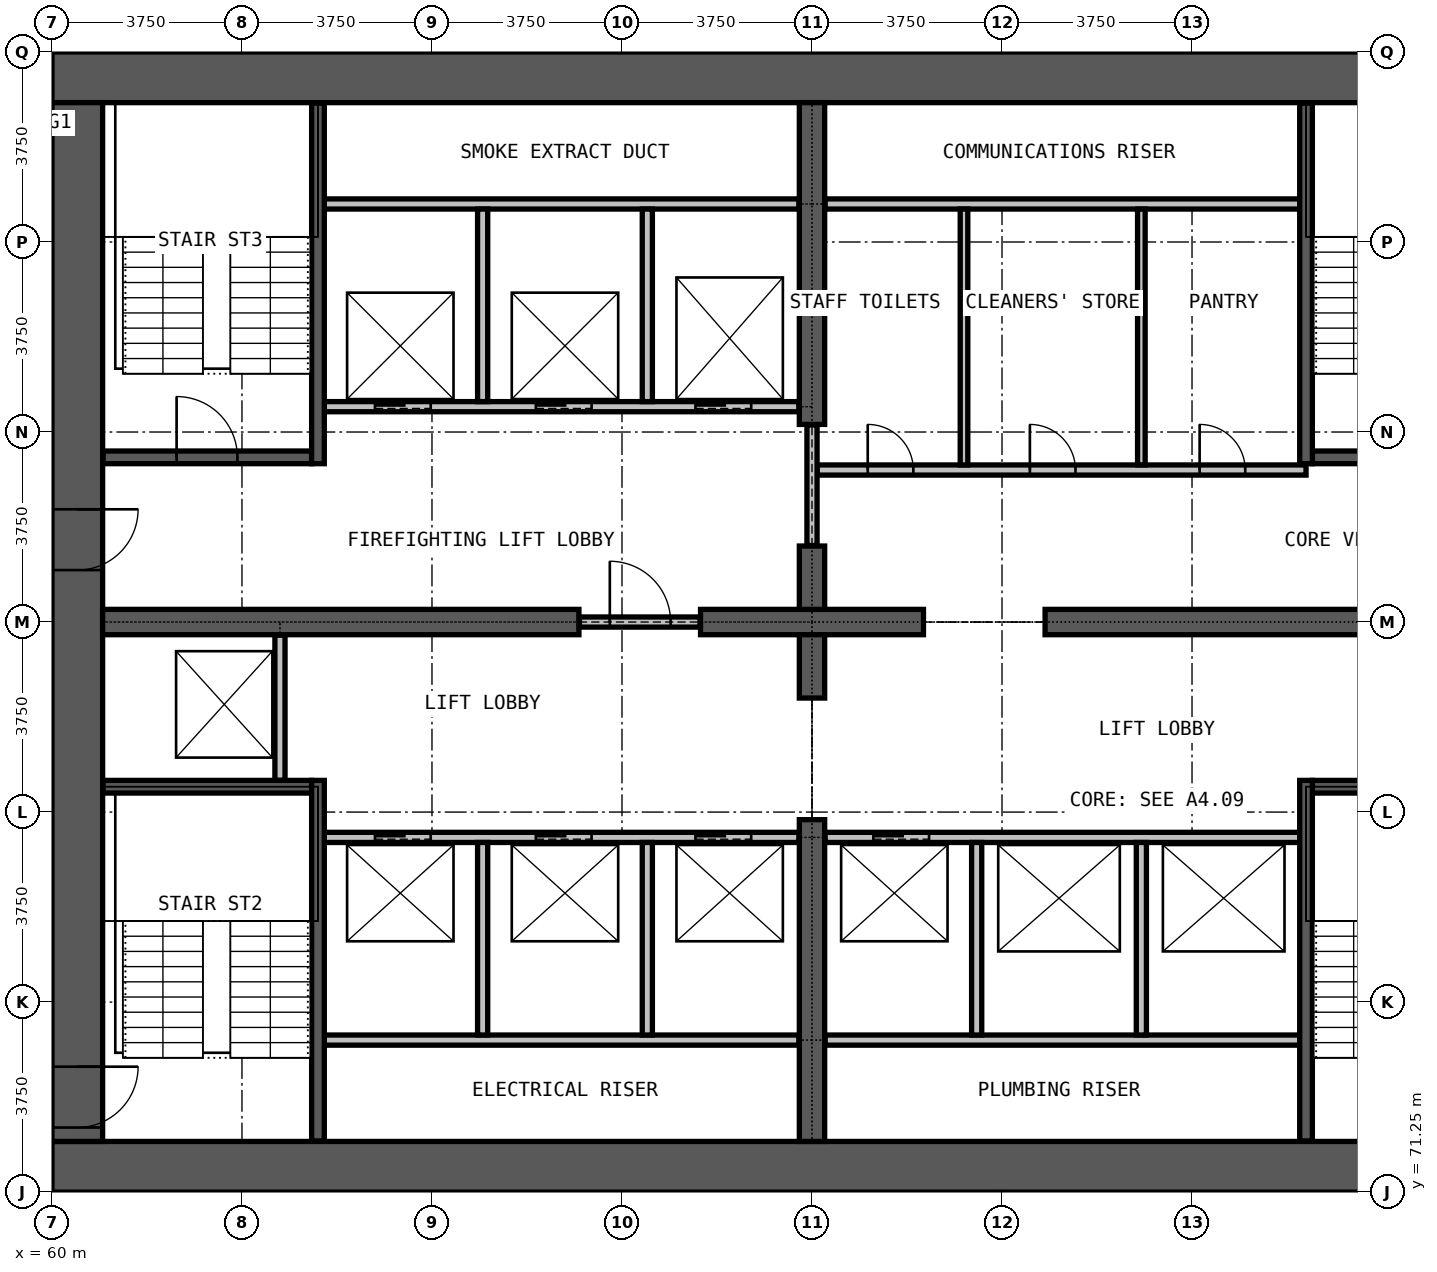
"""IFC4 building model, lengths in metres.
Left out: names, types, materials, properties, quantities, classifications, styles, units other than length and angle.
Written with IfcOpenShell. Run it as: python <this file> out.ifc"""

import sys

from ifc_helpers import new_model, si_unit, direction, frame, frame_2d, origin, place, context, subcontext, project, spatial, rectangle, extrude, element, fill, save


model = new_model("IFC4")
c1 = context("Model", 3, precision=1e-05, world=origin(), true_north=direction((0.0, 1.0)))
c2 = subcontext(c1, "Body", "Model", "MODEL_VIEW")
j1 = project(units=[si_unit("LENGTHUNIT", "METRE"), si_unit("PLANEANGLEUNIT", "RADIAN")], contexts=[c1])
p1 = place(None, origin())
s1 = spatial("IfcSite", under=j1, at=p1, CompositionType="ELEMENT")
p2 = place(p1, origin())
s2 = spatial("IfcBuilding", under=s1, at=p2, CompositionType="ELEMENT")
p3 = place(p2, frame((0.0, 0.0, 62.6)))
s3 = spatial("IfcBuildingStorey", under=s2, at=p3, CompositionType="ELEMENT", Elevation=62.6)
for number, where, z_axis, x_axis in (
    (1, (60.0, 71.75, 0.0), (0.0, 0.0, 1.0), (1.0, 0.0, 0.0)),
    (2, (90.0, 93.25, 0.0), (0.0, 0.0, 1.0), (-1.0, 0.0, 0.0)),
):
    element("IfcWall", number, at=place(p3, frame(where, z_axis=z_axis, x_axis=x_axis)), inside=s3, PredefinedType="SHEAR", context=c2, shape_type="SweptSolid", body=[
        extrude(rectangle(XDim=30.0, YDim=1.0, at=frame_2d((15.0, 0.0))), origin(), (0.0, 0.0, 1.0), 3.3),
    ])
p4 = place(p3, frame((60.5, 92.75, 0.0), z_axis=(0.0, 0.0, 1.0), x_axis=(0.0, -1.0, 0.0)))
e3 = element("IfcWall", 3, at=p4, inside=s3, PredefinedType="SHEAR", context=c2, shape_type="SweptSolid", body=[
    extrude(rectangle(XDim=20.5, YDim=1.0, at=frame_2d((10.25, 0.0))), origin(), (0.0, 0.0, 1.0), 3.3),
])
p5 = place(p4, frame((19.025, 0.0, 0.0)))
e4 = element("IfcOpeningElement", 4, at=p5, cuts=e3, PredefinedType="OPENING", context=c2, shape_type="SweptSolid", body=[
    extrude(rectangle(XDim=1.2, YDim=2.2, at=frame_2d((0.6, 1.1))), frame((0.0, 0.51, 0.0), z_axis=(0.0, -1.0, 0.0), x_axis=(1.0, 0.0, 0.0)), (0.0, 0.0, 1.0), 1.02),
])
p6 = place(p4, frame((8.025, 0.0, 0.0)))
e5 = element("IfcOpeningElement", 5, at=p6, cuts=e3, PredefinedType="OPENING", context=c2, shape_type="SweptSolid", body=[
    extrude(rectangle(XDim=1.2, YDim=2.2, at=frame_2d((0.6, 1.1))), frame((0.0, 0.51, 0.0), z_axis=(0.0, -1.0, 0.0), x_axis=(1.0, 0.0, 0.0)), (0.0, 0.0, 1.0), 1.02),
])
p7 = place(p3, frame((61.0, 82.5, 0.0), z_axis=(0.0, 0.0, 1.0), x_axis=(1.0, 0.0, 0.0)))
e6 = element("IfcWall", 6, at=p7, inside=s3, PredefinedType="SHEAR", context=c2, shape_type="SweptSolid", body=[
    extrude(rectangle(XDim=9.4, YDim=0.5, at=frame_2d((4.7, 0.0))), origin(), (0.0, 0.0, 1.0), 3.3),
])
p8 = place(p3, frame((72.8, 82.5, 0.0), z_axis=(0.0, 0.0, 1.0), x_axis=(1.0, 0.0, 0.0)))
e7 = element("IfcWall", 7, at=p8, inside=s3, PredefinedType="SHEAR", context=c2, shape_type="SweptSolid", body=[
    extrude(rectangle(XDim=4.4, YDim=0.5, at=frame_2d((2.2, 0.0))), origin(), (0.0, 0.0, 1.0), 3.3),
])
p9 = place(p3, frame((79.6, 82.5, 0.0), z_axis=(0.0, 0.0, 1.0), x_axis=(1.0, 0.0, 0.0)))
e8 = element("IfcWall", 8, at=p9, inside=s3, PredefinedType="SHEAR", context=c2, shape_type="SweptSolid", body=[
    extrude(rectangle(XDim=9.4, YDim=0.5, at=frame_2d((4.7, 0.0))), origin(), (0.0, 0.0, 1.0), 3.3),
])
p10 = place(p3, frame((75.0, 72.25, 0.0), z_axis=(0.0, 0.0, 1.0), x_axis=(0.0, 1.0, 0.0)))
e9 = element("IfcWall", 9, at=p10, inside=s3, PredefinedType="SHEAR", context=c2, shape_type="SweptSolid", body=[
    extrude(rectangle(XDim=6.35, YDim=0.5, at=frame_2d((3.175, 0.0))), origin(), (0.0, 0.0, 1.0), 3.3),
])
for number, where, z_axis, x_axis in (
    (10, (75.0, 81.0, 0.0), (0.0, 0.0, 1.0), (0.0, 1.0, 0.0)),
    (11, (75.0, 82.75, 0.0), (0.0, 0.0, 1.0), (0.0, 1.0, 0.0)),
):
    element("IfcWall", number, at=place(p3, frame(where, z_axis=z_axis, x_axis=x_axis)), inside=s3, PredefinedType="SHEAR", context=c2, shape_type="SweptSolid", body=[
        extrude(rectangle(XDim=1.25, YDim=0.5, at=frame_2d((0.625, 0.0))), origin(), (0.0, 0.0, 1.0), 3.3),
    ])
p11 = place(p3, frame((75.0, 86.4, 0.0), z_axis=(0.0, 0.0, 1.0), x_axis=(0.0, 1.0, 0.0)))
e12 = element("IfcWall", 12, at=p11, inside=s3, PredefinedType="SHEAR", context=c2, shape_type="SweptSolid", body=[
    extrude(rectangle(XDim=6.35, YDim=0.5, at=frame_2d((3.175, 0.0))), origin(), (0.0, 0.0, 1.0), 3.3),
])
p12 = place(p3, frame((70.41, 82.5, 0.0), z_axis=(0.0, 0.0, 1.0), x_axis=(1.0, 0.0, 0.0)))
e13 = element("IfcWall", 13, at=p12, inside=s3, PredefinedType="PARTITIONING", context=c2, shape_type="SweptSolid", body=[
    extrude(rectangle(XDim=2.38, YDim=0.2, at=frame_2d((1.19, 0.0))), origin(), (0.0, 0.0, 1.0), 2.4),
])
p13 = place(p12, frame((0.6, 0.0, 0.0)))
e14 = element("IfcOpeningElement", 14, at=p13, cuts=e13, PredefinedType="OPENING", context=c2, shape_type="SweptSolid", body=[
    extrude(rectangle(XDim=1.2, YDim=2.2, at=frame_2d((0.6, 1.1))), frame((0.0, 0.11, 0.0), z_axis=(0.0, -1.0, 0.0), x_axis=(1.0, 0.0, 0.0)), (0.0, 0.0, 1.0), 0.22),
])
p14 = place(p3, frame((75.1, 85.5, 0.0), z_axis=(0.0, 0.0, 1.0), x_axis=(1.0, 0.0, 0.0)))
e15 = element("IfcWall", 15, at=p14, inside=s3, PredefinedType="PARTITIONING", context=c2, shape_type="SweptSolid", body=[
    extrude(rectangle(XDim=9.65, YDim=0.2, at=frame_2d((4.825, 0.0))), origin(), (0.0, 0.0, 1.0), 3.0),
])
p15 = place(p14, frame((1.0, 0.0, 0.0)))
e16 = element("IfcOpeningElement", 16, at=p15, cuts=e15, PredefinedType="OPENING", context=c2, shape_type="SweptSolid", body=[
    extrude(rectangle(XDim=0.9, YDim=2.2, at=frame_2d((0.45, 1.1))), frame((0.0, 0.11, 0.0), z_axis=(0.0, -1.0, 0.0), x_axis=(1.0, 0.0, 0.0)), (0.0, 0.0, 1.0), 0.22),
])
p16 = place(p14, frame((4.2, 0.0, 0.0)))
e17 = element("IfcOpeningElement", 17, at=p16, cuts=e15, PredefinedType="OPENING", context=c2, shape_type="SweptSolid", body=[
    extrude(rectangle(XDim=0.9, YDim=2.2, at=frame_2d((0.45, 1.1))), frame((0.0, 0.11, 0.0), z_axis=(0.0, -1.0, 0.0), x_axis=(1.0, 0.0, 0.0)), (0.0, 0.0, 1.0), 0.22),
])
p17 = place(p14, frame((7.55, 0.0, 0.0)))
e18 = element("IfcOpeningElement", 18, at=p17, cuts=e15, PredefinedType="OPENING", context=c2, shape_type="SweptSolid", body=[
    extrude(rectangle(XDim=0.9, YDim=2.2, at=frame_2d((0.45, 1.1))), frame((0.0, 0.11, 0.0), z_axis=(0.0, -1.0, 0.0), x_axis=(1.0, 0.0, 0.0)), (0.0, 0.0, 1.0), 0.22),
])
p18 = place(p3, frame((75.26, 90.75, 0.0), z_axis=(0.0, 0.0, 1.0), x_axis=(1.0, 0.0, 0.0)))
e19 = element("IfcWall", 19, at=p18, inside=s3, PredefinedType="PARTITIONING", context=c2, shape_type="SweptSolid", body=[
    extrude(rectangle(XDim=9.365, YDim=0.2, at=frame_2d((4.683, 0.0))), origin(), (0.0, 0.0, 1.0), 3.0),
])
p19 = place(p3, frame((75.0, 84.01, 0.0), z_axis=(0.0, 0.0, 1.0), x_axis=(0.0, 1.0, 0.0)))
e20 = element("IfcWall", 20, at=p19, inside=s3, PredefinedType="PARTITIONING", context=c2, shape_type="SweptSolid", body=[
    extrude(rectangle(XDim=2.38, YDim=0.2, at=frame_2d((1.19, 0.0))), origin(), (0.0, 0.0, 1.0), 2.4),
])
for number, where, z_axis, x_axis in (
    (21, (78.0, 85.6, 0.0), (0.0, 0.0, 1.0), (0.0, 1.0, 0.0)),
    (22, (81.5, 85.6, 0.0), (0.0, 0.0, 1.0), (0.0, 1.0, 0.0)),
):
    element("IfcWall", number, at=place(p3, frame(where, z_axis=z_axis, x_axis=x_axis)), inside=s3, PredefinedType="PARTITIONING", context=c2, shape_type="SweptSolid", body=[
        extrude(rectangle(XDim=5.05, YDim=0.15, at=frame_2d((2.525, 0.0))), origin(), (0.0, 0.0, 1.0), 3.0),
    ])
for number, where, z_axis, x_axis in (
    (23, (65.375, 74.25, 0.0), (0.0, 0.0, 1.0), (1.0, 0.0, 0.0)),
    (24, (75.26, 74.25, 0.0), (0.0, 0.0, 1.0), (1.0, 0.0, 0.0)),
):
    element("IfcWall", number, at=place(p3, frame(where, z_axis=z_axis, x_axis=x_axis)), inside=s3, PredefinedType="PARTITIONING", context=c2, shape_type="SweptSolid", body=[
        extrude(rectangle(XDim=9.365, YDim=0.2, at=frame_2d((4.683, 0.0))), origin(), (0.0, 0.0, 1.0), 3.0),
    ])
p20 = place(p3, frame((65.375, 78.25, 0.0), z_axis=(0.0, 0.0, 1.0), x_axis=(1.0, 0.0, 0.0)))
e25 = element("IfcWall", 25, at=p20, inside=s3, PredefinedType="PARTITIONING", context=c2, shape_type="SweptSolid", body=[
    extrude(rectangle(XDim=9.365, YDim=0.2, at=frame_2d((4.683, 0.0))), origin(), (0.0, 0.0, 1.0), 3.0),
])
p21 = place(p20, frame((1.0, 0.0, 0.0)))
e26 = element("IfcOpeningElement", 26, at=p21, cuts=e25, PredefinedType="OPENING", context=c2, shape_type="SweptSolid", body=[
    extrude(rectangle(XDim=1.1, YDim=2.2, at=frame_2d((0.55, 1.1))), frame((0.0, 0.11, 0.0), z_axis=(0.0, -1.0, 0.0), x_axis=(1.0, 0.0, 0.0)), (0.0, 0.0, 1.0), 0.22),
])
p22 = place(p20, frame((4.175, 0.0, 0.0)))
e27 = element("IfcOpeningElement", 27, at=p22, cuts=e25, PredefinedType="OPENING", context=c2, shape_type="SweptSolid", body=[
    extrude(rectangle(XDim=1.1, YDim=2.2, at=frame_2d((0.55, 1.1))), frame((0.0, 0.11, 0.0), z_axis=(0.0, -1.0, 0.0), x_axis=(1.0, 0.0, 0.0)), (0.0, 0.0, 1.0), 0.22),
])
p23 = place(p20, frame((7.325, 0.0, 0.0)))
e28 = element("IfcOpeningElement", 28, at=p23, cuts=e25, PredefinedType="OPENING", context=c2, shape_type="SweptSolid", body=[
    extrude(rectangle(XDim=1.1, YDim=2.2, at=frame_2d((0.55, 1.1))), frame((0.0, 0.11, 0.0), z_axis=(0.0, -1.0, 0.0), x_axis=(1.0, 0.0, 0.0)), (0.0, 0.0, 1.0), 0.22),
])
p24 = place(p3, frame((75.26, 78.25, 0.0), z_axis=(0.0, 0.0, 1.0), x_axis=(1.0, 0.0, 0.0)))
e29 = element("IfcWall", 29, at=p24, inside=s3, PredefinedType="PARTITIONING", context=c2, shape_type="SweptSolid", body=[
    extrude(rectangle(XDim=9.365, YDim=0.2, at=frame_2d((4.683, 0.0))), origin(), (0.0, 0.0, 1.0), 3.0),
])
p25 = place(p24, frame((0.95, 0.0, 0.0)))
e30 = element("IfcOpeningElement", 30, at=p25, cuts=e29, PredefinedType="OPENING", context=c2, shape_type="SweptSolid", body=[
    extrude(rectangle(XDim=1.1, YDim=2.2, at=frame_2d((0.55, 1.1))), frame((0.0, 0.11, 0.0), z_axis=(0.0, -1.0, 0.0), x_axis=(1.0, 0.0, 0.0)), (0.0, 0.0, 1.0), 0.22),
])
p26 = place(p3, frame((65.375, 86.75, 0.0), z_axis=(0.0, 0.0, 1.0), x_axis=(1.0, 0.0, 0.0)))
e31 = element("IfcWall", 31, at=p26, inside=s3, PredefinedType="PARTITIONING", context=c2, shape_type="SweptSolid", body=[
    extrude(rectangle(XDim=9.365, YDim=0.2, at=frame_2d((4.683, 0.0))), origin(), (0.0, 0.0, 1.0), 3.0),
])
p27 = place(p26, frame((1.0, 0.0, 0.0)))
e32 = element("IfcOpeningElement", 32, at=p27, cuts=e31, PredefinedType="OPENING", context=c2, shape_type="SweptSolid", body=[
    extrude(rectangle(XDim=1.1, YDim=2.2, at=frame_2d((0.55, 1.1))), frame((0.0, 0.11, 0.0), z_axis=(0.0, -1.0, 0.0), x_axis=(1.0, 0.0, 0.0)), (0.0, 0.0, 1.0), 0.22),
])
p28 = place(p26, frame((4.175, 0.0, 0.0)))
e33 = element("IfcOpeningElement", 33, at=p28, cuts=e31, PredefinedType="OPENING", context=c2, shape_type="SweptSolid", body=[
    extrude(rectangle(XDim=1.1, YDim=2.2, at=frame_2d((0.55, 1.1))), frame((0.0, 0.11, 0.0), z_axis=(0.0, -1.0, 0.0), x_axis=(1.0, 0.0, 0.0)), (0.0, 0.0, 1.0), 0.22),
])
p29 = place(p26, frame((7.325, 0.0, 0.0)))
e34 = element("IfcOpeningElement", 34, at=p29, cuts=e31, PredefinedType="OPENING", context=c2, shape_type="SweptSolid", body=[
    extrude(rectangle(XDim=1.1, YDim=2.2, at=frame_2d((0.55, 1.1))), frame((0.0, 0.11, 0.0), z_axis=(0.0, -1.0, 0.0), x_axis=(1.0, 0.0, 0.0)), (0.0, 0.0, 1.0), 0.22),
])
p30 = place(p3, frame((65.375, 90.75, 0.0), z_axis=(0.0, 0.0, 1.0), x_axis=(1.0, 0.0, 0.0)))
e35 = element("IfcWall", 35, at=p30, inside=s3, PredefinedType="PARTITIONING", context=c2, shape_type="SweptSolid", body=[
    extrude(rectangle(XDim=9.365, YDim=0.2, at=frame_2d((4.683, 0.0))), origin(), (0.0, 0.0, 1.0), 3.0),
])
p31 = place(p3, frame((64.5, 79.375, 0.0), z_axis=(0.0, 0.0, 1.0), x_axis=(0.0, 1.0, 0.0)))
e36 = element("IfcWall", 36, at=p31, inside=s3, PredefinedType="PARTITIONING", context=c2, shape_type="SweptSolid", body=[
    extrude(rectangle(XDim=2.865, YDim=0.2, at=frame_2d((1.433, 0.0))), origin(), (0.0, 0.0, 1.0), 3.0),
])
for number, where, z_axis, x_axis in (
    (37, (68.5, 74.35, 0.0), (0.0, 0.0, 1.0), (0.0, 1.0, 0.0)),
    (38, (68.5, 86.85, 0.0), (0.0, 0.0, 1.0), (0.0, 1.0, 0.0)),
    (39, (71.75, 74.35, 0.0), (0.0, 0.0, 1.0), (0.0, 1.0, 0.0)),
    (40, (71.75, 86.85, 0.0), (0.0, 0.0, 1.0), (0.0, 1.0, 0.0)),
    (41, (78.25, 74.35, 0.0), (0.0, 0.0, 1.0), (0.0, 1.0, 0.0)),
    (42, (81.5, 74.35, 0.0), (0.0, 0.0, 1.0), (0.0, 1.0, 0.0)),
):
    element("IfcWall", number, at=place(p3, frame(where, z_axis=z_axis, x_axis=x_axis)), inside=s3, PredefinedType="PARTITIONING", context=c2, shape_type="SweptSolid", body=[
        extrude(rectangle(XDim=3.8, YDim=0.2, at=frame_2d((1.9, 0.0))), origin(), (0.0, 0.0, 1.0), 3.0),
    ])
for number, where, z_axis, x_axis in (
    (43, (61.01, 79.25, 0.0), (0.0, 0.0, 1.0), (1.0, 0.0, 0.0)),
    (44, (84.875, 79.25, 0.0), (0.0, 0.0, 1.0), (1.0, 0.0, 0.0)),
):
    element("IfcWall", number, at=place(p3, frame(where, z_axis=z_axis, x_axis=x_axis)), inside=s3, PredefinedType="PARTITIONING", context=c2, shape_type="SweptSolid", body=[
        extrude(rectangle(XDim=4.115, YDim=0.25, at=frame_2d((2.058, 0.0))), origin(), (0.0, 0.0, 1.0), 3.0),
    ])
p32 = place(p3, frame((61.01, 85.75, 0.0), z_axis=(0.0, 0.0, 1.0), x_axis=(1.0, 0.0, 0.0)))
e45 = element("IfcWall", 45, at=p32, inside=s3, PredefinedType="PARTITIONING", context=c2, shape_type="SweptSolid", body=[
    extrude(rectangle(XDim=4.115, YDim=0.25, at=frame_2d((2.058, 0.0))), origin(), (0.0, 0.0, 1.0), 3.0),
])
p33 = place(p32, frame((1.45, 0.0, 0.0)))
e46 = element("IfcOpeningElement", 46, at=p33, cuts=e45, PredefinedType="OPENING", context=c2, shape_type="SweptSolid", body=[
    extrude(rectangle(XDim=1.2, YDim=2.2, at=frame_2d((0.6, 1.1))), frame((0.0, 0.135, 0.0), z_axis=(0.0, -1.0, 0.0), x_axis=(1.0, 0.0, 0.0)), (0.0, 0.0, 1.0), 0.27),
])
p34 = place(p3, frame((84.875, 85.75, 0.0), z_axis=(0.0, 0.0, 1.0), x_axis=(1.0, 0.0, 0.0)))
e47 = element("IfcWall", 47, at=p34, inside=s3, PredefinedType="PARTITIONING", context=c2, shape_type="SweptSolid", body=[
    extrude(rectangle(XDim=4.115, YDim=0.25, at=frame_2d((2.058, 0.0))), origin(), (0.0, 0.0, 1.0), 3.0),
])
for number, where, z_axis, x_axis in (
    (48, (65.25, 72.26, 0.0), (0.0, 0.0, 1.0), (0.0, 1.0, 0.0)),
    (49, (65.25, 85.625, 0.0), (0.0, 0.0, 1.0), (0.0, 1.0, 0.0)),
    (50, (84.75, 72.26, 0.0), (0.0, 0.0, 1.0), (0.0, 1.0, 0.0)),
    (51, (84.75, 85.625, 0.0), (0.0, 0.0, 1.0), (0.0, 1.0, 0.0)),
):
    element("IfcWall", number, at=place(p3, frame(where, z_axis=z_axis, x_axis=x_axis)), inside=s3, PredefinedType="PARTITIONING", context=c2, shape_type="SweptSolid", body=[
        extrude(rectangle(XDim=7.115, YDim=0.25, at=frame_2d((3.558, 0.0))), origin(), (0.0, 0.0, 1.0), 3.0),
    ])
p35 = place(p21, origin())
e52 = element("IfcDoor", 52, at=p35, inside=s3, OperationType="DOUBLE_DOOR_SLIDING", PredefinedType="DOOR", context=c2, shape_type="SweptSolid", body=[
    extrude(rectangle(XDim=1.1, YDim=2.2, at=frame_2d((0.55, 1.1))), frame((0.0, 0.025, 0.0), z_axis=(0.0, -1.0, 0.0), x_axis=(1.0, 0.0, 0.0)), (0.0, 0.0, 1.0), 0.05),
])
fill(e26, e52)
p36 = place(p22, origin())
e53 = element("IfcDoor", 53, at=p36, inside=s3, OperationType="DOUBLE_DOOR_SLIDING", PredefinedType="DOOR", context=c2, shape_type="SweptSolid", body=[
    extrude(rectangle(XDim=1.1, YDim=2.2, at=frame_2d((0.55, 1.1))), frame((0.0, 0.025, 0.0), z_axis=(0.0, -1.0, 0.0), x_axis=(1.0, 0.0, 0.0)), (0.0, 0.0, 1.0), 0.05),
])
fill(e27, e53)
p37 = place(p23, origin())
e54 = element("IfcDoor", 54, at=p37, inside=s3, OperationType="DOUBLE_DOOR_SLIDING", PredefinedType="DOOR", context=c2, shape_type="SweptSolid", body=[
    extrude(rectangle(XDim=1.1, YDim=2.2, at=frame_2d((0.55, 1.1))), frame((0.0, 0.025, 0.0), z_axis=(0.0, -1.0, 0.0), x_axis=(1.0, 0.0, 0.0)), (0.0, 0.0, 1.0), 0.05),
])
fill(e28, e54)
p38 = place(p25, origin())
e55 = element("IfcDoor", 55, at=p38, inside=s3, OperationType="DOUBLE_DOOR_SLIDING", PredefinedType="DOOR", context=c2, shape_type="SweptSolid", body=[
    extrude(rectangle(XDim=1.1, YDim=2.2, at=frame_2d((0.55, 1.1))), frame((0.0, 0.025, 0.0), z_axis=(0.0, -1.0, 0.0), x_axis=(1.0, 0.0, 0.0)), (0.0, 0.0, 1.0), 0.05),
])
fill(e30, e55)
p39 = place(p27, origin())
e56 = element("IfcDoor", 56, at=p39, inside=s3, OperationType="DOUBLE_DOOR_SLIDING", PredefinedType="DOOR", context=c2, shape_type="SweptSolid", body=[
    extrude(rectangle(XDim=1.1, YDim=2.2, at=frame_2d((0.55, 1.1))), frame((0.0, 0.025, 0.0), z_axis=(0.0, -1.0, 0.0), x_axis=(1.0, 0.0, 0.0)), (0.0, 0.0, 1.0), 0.05),
])
fill(e32, e56)
p40 = place(p28, origin())
e57 = element("IfcDoor", 57, at=p40, inside=s3, OperationType="DOUBLE_DOOR_SLIDING", PredefinedType="DOOR", context=c2, shape_type="SweptSolid", body=[
    extrude(rectangle(XDim=1.1, YDim=2.2, at=frame_2d((0.55, 1.1))), frame((0.0, 0.025, 0.0), z_axis=(0.0, -1.0, 0.0), x_axis=(1.0, 0.0, 0.0)), (0.0, 0.0, 1.0), 0.05),
])
fill(e33, e57)
p41 = place(p29, origin())
e58 = element("IfcDoor", 58, at=p41, inside=s3, OperationType="DOUBLE_DOOR_SLIDING", PredefinedType="DOOR", context=c2, shape_type="SweptSolid", body=[
    extrude(rectangle(XDim=1.1, YDim=2.2, at=frame_2d((0.55, 1.1))), frame((0.0, 0.025, 0.0), z_axis=(0.0, -1.0, 0.0), x_axis=(1.0, 0.0, 0.0)), (0.0, 0.0, 1.0), 0.05),
])
fill(e34, e58)
p42 = place(p13, origin())
e59 = element("IfcDoor", 59, at=p42, inside=s3, OperationType="SINGLE_SWING_RIGHT", PredefinedType="DOOR", context=c2, shape_type="SweptSolid", body=[
    extrude(rectangle(XDim=1.2, YDim=2.2, at=frame_2d((0.6, 1.1))), frame((0.0, 0.025, 0.0), z_axis=(0.0, -1.0, 0.0), x_axis=(1.0, 0.0, 0.0)), (0.0, 0.0, 1.0), 0.05),
])
fill(e14, e59)
p43 = place(p33, origin())
e60 = element("IfcDoor", 60, at=p43, inside=s3, OperationType="SINGLE_SWING_RIGHT", PredefinedType="DOOR", context=c2, shape_type="SweptSolid", body=[
    extrude(rectangle(XDim=1.2, YDim=2.2, at=frame_2d((0.6, 1.1))), frame((0.0, 0.025, 0.0), z_axis=(0.0, -1.0, 0.0), x_axis=(1.0, 0.0, 0.0)), (0.0, 0.0, 1.0), 0.05),
])
fill(e46, e60)
p44 = place(p5, origin())
e61 = element("IfcDoor", 61, at=p44, inside=s3, OperationType="SINGLE_SWING_LEFT", PredefinedType="DOOR", context=c2, shape_type="SweptSolid", body=[
    extrude(rectangle(XDim=1.2, YDim=2.2, at=frame_2d((0.6, 1.1))), frame((0.0, 0.025, 0.0), z_axis=(0.0, -1.0, 0.0), x_axis=(1.0, 0.0, 0.0)), (0.0, 0.0, 1.0), 0.05),
])
fill(e4, e61)
p45 = place(p6, origin())
e62 = element("IfcDoor", 62, at=p45, inside=s3, OperationType="SINGLE_SWING_LEFT", PredefinedType="DOOR", context=c2, shape_type="SweptSolid", body=[
    extrude(rectangle(XDim=1.2, YDim=2.2, at=frame_2d((0.6, 1.1))), frame((0.0, 0.025, 0.0), z_axis=(0.0, -1.0, 0.0), x_axis=(1.0, 0.0, 0.0)), (0.0, 0.0, 1.0), 0.05),
])
fill(e5, e62)
p46 = place(p15, origin())
e63 = element("IfcDoor", 63, at=p46, inside=s3, OperationType="SINGLE_SWING_RIGHT", PredefinedType="DOOR", context=c2, shape_type="SweptSolid", body=[
    extrude(rectangle(XDim=0.9, YDim=2.2, at=frame_2d((0.45, 1.1))), frame((0.0, 0.025, 0.0), z_axis=(0.0, -1.0, 0.0), x_axis=(1.0, 0.0, 0.0)), (0.0, 0.0, 1.0), 0.05),
])
fill(e16, e63)
p47 = place(p16, origin())
e64 = element("IfcDoor", 64, at=p47, inside=s3, OperationType="SINGLE_SWING_RIGHT", PredefinedType="DOOR", context=c2, shape_type="SweptSolid", body=[
    extrude(rectangle(XDim=0.9, YDim=2.2, at=frame_2d((0.45, 1.1))), frame((0.0, 0.025, 0.0), z_axis=(0.0, -1.0, 0.0), x_axis=(1.0, 0.0, 0.0)), (0.0, 0.0, 1.0), 0.05),
])
fill(e17, e64)
p48 = place(p17, origin())
e65 = element("IfcDoor", 65, at=p48, inside=s3, OperationType="SINGLE_SWING_RIGHT", PredefinedType="DOOR", context=c2, shape_type="SweptSolid", body=[
    extrude(rectangle(XDim=0.9, YDim=2.2, at=frame_2d((0.45, 1.1))), frame((0.0, 0.025, 0.0), z_axis=(0.0, -1.0, 0.0), x_axis=(1.0, 0.0, 0.0)), (0.0, 0.0, 1.0), 0.05),
])
fill(e18, e65)
save(model, sys.argv[1])
